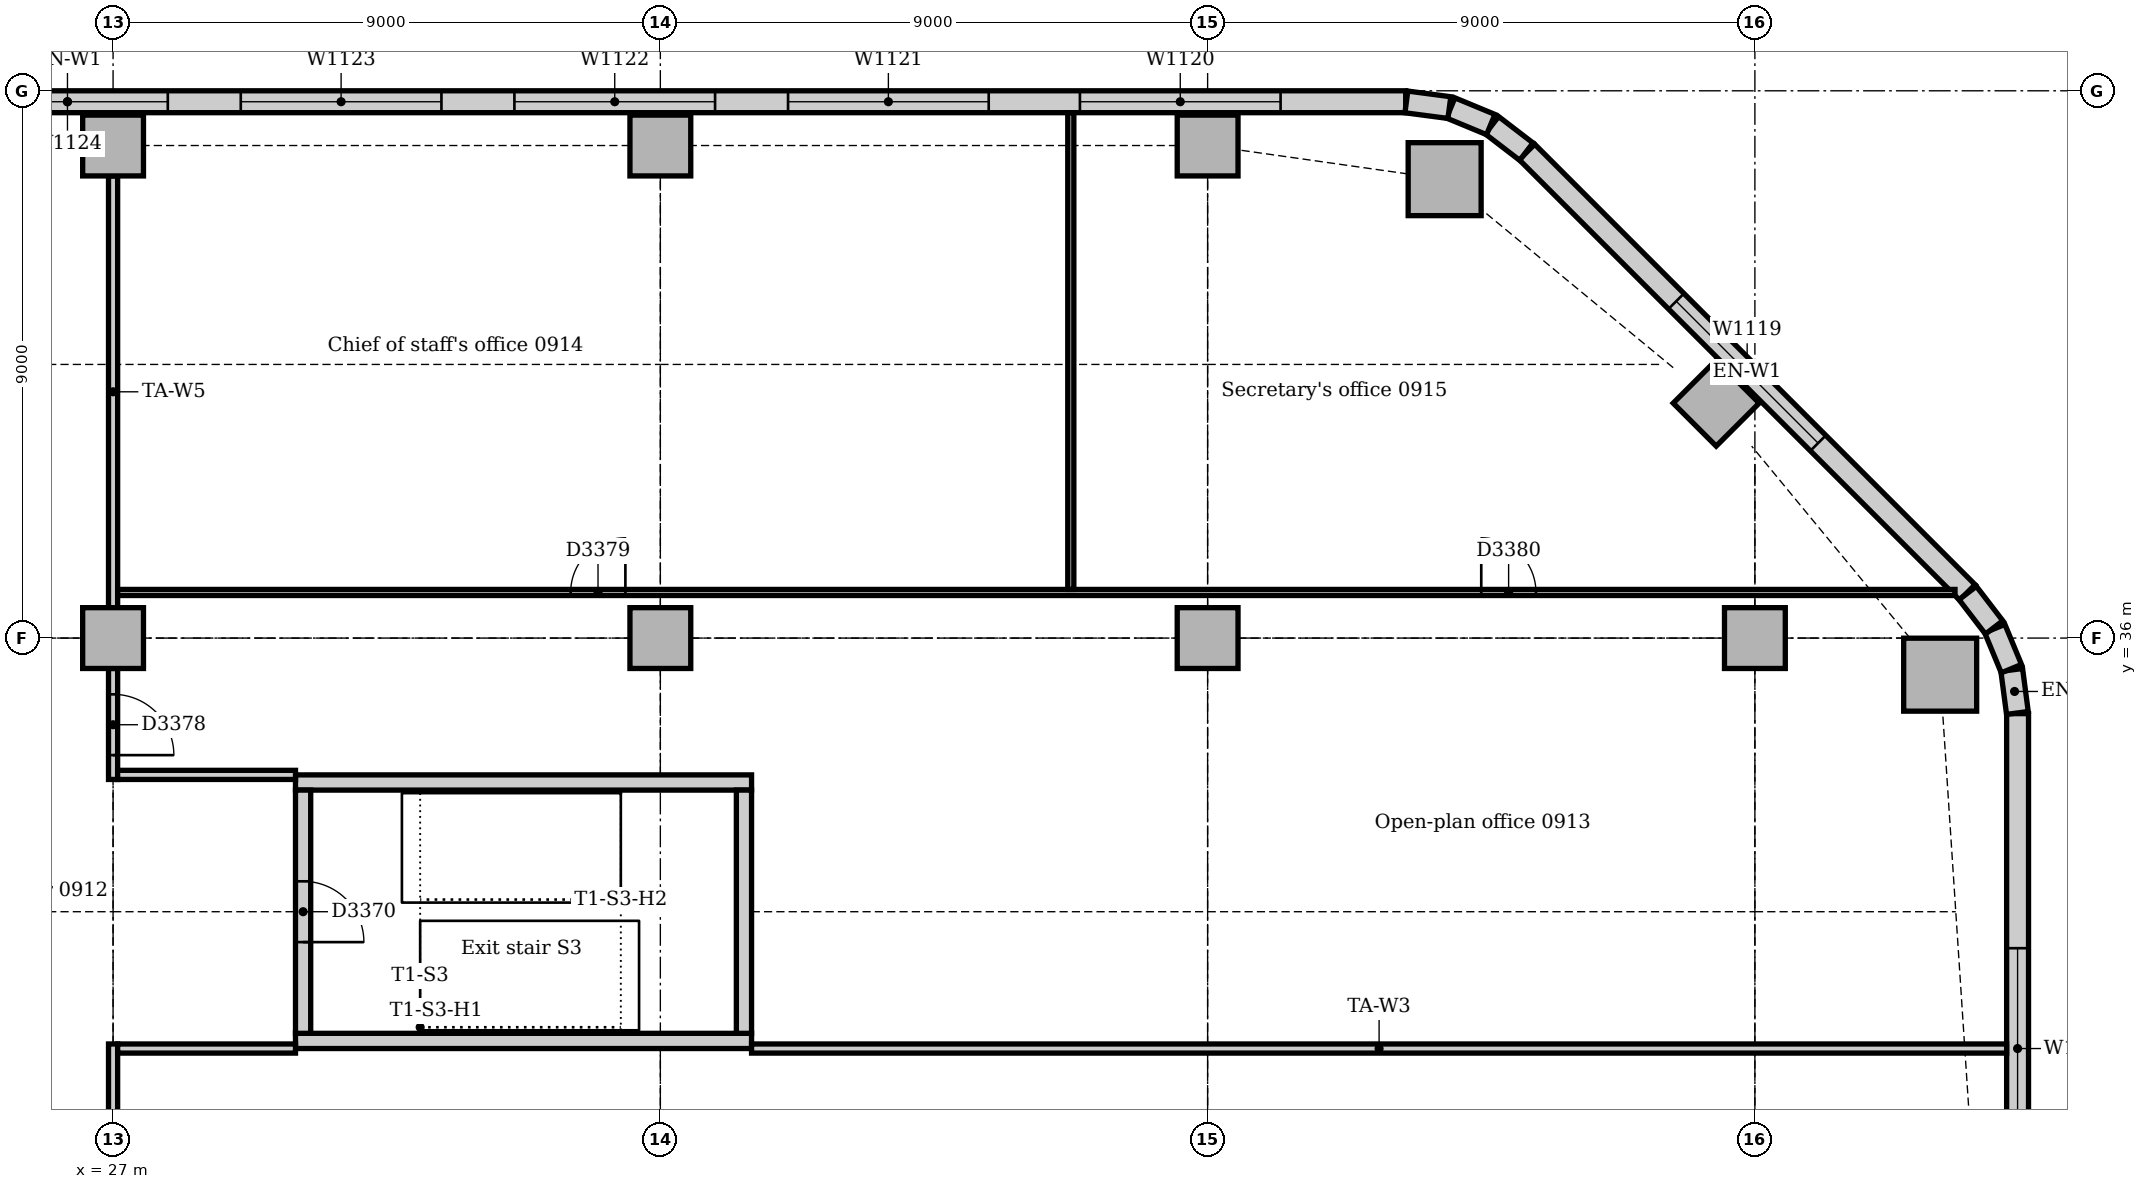
"""IFC4 building model, lengths in metres.
Left out: names, types, materials, properties, quantities, classifications, styles, units other than length and angle.
Written with IfcOpenShell. Run it as: python <this file> out.ifc"""

import sys

from ifc_helpers import new_model, si_unit, direction, frame, frame_2d, origin, origin_2d, place, context, subcontext, project, spatial, rectangle, extrude, element, fill, save


model = new_model("IFC4")
c1 = context("Model", 3, precision=1e-05, world=origin(), true_north=direction((0.0, 1.0)))
c2 = subcontext(c1, "Body", "Model", "MODEL_VIEW")
j1 = project(units=[si_unit("LENGTHUNIT", "METRE"), si_unit("PLANEANGLEUNIT", "RADIAN")], contexts=[c1])
p1 = place(None, origin())
s1 = spatial("IfcSite", under=j1, at=p1, CompositionType="ELEMENT")
p2 = place(p1, origin())
s2 = spatial("IfcBuilding", under=s1, at=p2, CompositionType="ELEMENT")
p3 = place(p2, frame((0.0, 0.0, 42.0)))
s3 = spatial("IfcBuildingStorey", under=s2, at=p3, CompositionType="ELEMENT", Elevation=42.0)
for number, where, z_axis, x_axis in (
    (1, (30.0, 29.375, 0.0), (0.0, 0.0, 1.0), (1.0, 0.0, 0.0)),
    (2, (37.5, 33.625, 0.0), (0.0, 0.0, 1.0), (-1.0, 0.0, 0.0)),
):
    element("IfcWall", number, at=place(p3, frame(where, z_axis=z_axis, x_axis=x_axis)), inside=s3, PredefinedType="SOLIDWALL", context=c2, shape_type="SweptSolid", body=[
        extrude(rectangle(XDim=7.5, YDim=0.25, at=frame_2d((3.75, 0.0))), origin(), (0.0, 0.0, 1.0), 4.0),
    ])
p4 = place(p3, frame((37.375, 29.5, 0.0), z_axis=(0.0, 0.0, 1.0), x_axis=(0.0, 1.0, 0.0)))
e3 = element("IfcWall", 3, at=p4, inside=s3, PredefinedType="SOLIDWALL", context=c2, shape_type="SweptSolid", body=[
    extrude(rectangle(XDim=4.0, YDim=0.25, at=frame_2d((2.0, 0.0))), origin(), (0.0, 0.0, 1.0), 4.0),
])
p5 = place(p3, frame((30.125, 33.5, 0.0), z_axis=(0.0, 0.0, 1.0), x_axis=(0.0, -1.0, 0.0)))
e4 = element("IfcWall", 4, at=p5, inside=s3, PredefinedType="SOLIDWALL", context=c2, shape_type="SweptSolid", body=[
    extrude(rectangle(XDim=4.0, YDim=0.25, at=frame_2d((2.0, 0.0))), origin(), (0.0, 0.0, 1.0), 4.0),
])
p6 = place(p5, frame((1.5, 0.0, 0.0)))
e5 = element("IfcOpeningElement", 5, at=p6, cuts=e4, PredefinedType="OPENING", context=c2, shape_type="SweptSolid", body=[
    extrude(rectangle(XDim=1.0, YDim=2.1, at=frame_2d((0.5, 1.05))), frame((0.0, 0.135, 0.0), z_axis=(0.0, -1.0, 0.0), x_axis=(1.0, 0.0, 0.0)), (0.0, 0.0, 1.0), 0.27),
])
for number, where, z_axis, x_axis in (
    (6, (57.047, 35.398, 0.0), (0.0, 0.0, 1.0), (1.0, 0.0, 0.0)),
    (7, (48.898, 43.547, 0.0), (0.0, 0.0, 1.0), (1.0, 0.0, 0.0)),
):
    element("IfcColumn", number, at=place(p3, frame(where, z_axis=z_axis, x_axis=x_axis)), inside=s3, PredefinedType="COLUMN", context=c2, shape_type="SweptSolid", body=[
        extrude(rectangle(XDim=1.2, YDim=1.2, at=origin_2d()), origin(), (0.0, 0.0, 1.0), 3.7),
    ])
for number, where, z_axis, x_axis in (
    (8, (53.364, 39.864, 0.0), (0.0, 0.0, 1.0), (0.707, 0.707, 0.0)),
    (9, (27.0, 44.1, 0.0), (0.0, 0.0, 1.0), (1.0, 0.0, 0.0)),
    (10, (36.0, 44.1, 0.0), (0.0, 0.0, 1.0), (1.0, 0.0, 0.0)),
    (11, (45.0, 44.1, 0.0), (0.0, 0.0, 1.0), (1.0, 0.0, 0.0)),
    (12, (27.0, 36.0, 0.0), (0.0, 0.0, 1.0), (1.0, 0.0, 0.0)),
    (13, (36.0, 36.0, 0.0), (0.0, 0.0, 1.0), (1.0, 0.0, 0.0)),
    (14, (45.0, 36.0, 0.0), (0.0, 0.0, 1.0), (1.0, 0.0, 0.0)),
    (15, (54.0, 36.0, 0.0), (0.0, 0.0, 1.0), (1.0, 0.0, 0.0)),
):
    element("IfcColumn", number, at=place(p3, frame(where, z_axis=z_axis, x_axis=x_axis)), inside=s3, PredefinedType="COLUMN", context=c2, shape_type="SweptSolid", body=[
        extrude(rectangle(XDim=1.0, YDim=1.0, at=origin_2d()), origin(), (0.0, 0.0, 1.0), 3.7),
    ])
p7 = place(p3, frame((58.32, 10.243, 0.0), z_axis=(0.0, 0.0, 1.0), x_axis=(0.0, 1.0, 0.0)))
e16 = element("IfcWall", 16, at=p7, inside=s3, PredefinedType="STANDARD", context=c2, shape_type="SweptSolid", body=[
    extrude(rectangle(XDim=24.515, YDim=0.36, at=frame_2d((12.257, 0.0))), origin(), (0.0, 0.0, 1.0), 3.7),
])
p8 = place(p7, frame((3.857, 0.0, 0.9)))
e17 = element("IfcOpeningElement", 17, at=p8, cuts=e16, PredefinedType="OPENING", context=c2, shape_type="SweptSolid", body=[
    extrude(rectangle(XDim=3.3, YDim=1.6, at=frame_2d((1.65, 0.8))), frame((0.0, 0.19, 0.0), z_axis=(0.0, -1.0, 0.0), x_axis=(1.0, 0.0, 0.0)), (0.0, 0.0, 1.0), 0.38),
])
p9 = place(p7, frame((8.757, 0.0, 0.9)))
e18 = element("IfcOpeningElement", 18, at=p9, cuts=e16, PredefinedType="OPENING", context=c2, shape_type="SweptSolid", body=[
    extrude(rectangle(XDim=1.8, YDim=1.6, at=frame_2d((0.9, 0.8))), frame((0.0, 0.19, 0.0), z_axis=(0.0, -1.0, 0.0), x_axis=(1.0, 0.0, 0.0)), (0.0, 0.0, 1.0), 0.38),
])
p10 = place(p7, frame((12.857, 0.0, 0.9)))
e19 = element("IfcOpeningElement", 19, at=p10, cuts=e16, PredefinedType="OPENING", context=c2, shape_type="SweptSolid", body=[
    extrude(rectangle(XDim=3.3, YDim=1.6, at=frame_2d((1.65, 0.8))), frame((0.0, 0.19, 0.0), z_axis=(0.0, -1.0, 0.0), x_axis=(1.0, 0.0, 0.0)), (0.0, 0.0, 1.0), 0.38),
])
p11 = place(p7, frame((17.357, 0.0, 0.9)))
e20 = element("IfcOpeningElement", 20, at=p11, cuts=e16, PredefinedType="OPENING", context=c2, shape_type="SweptSolid", body=[
    extrude(rectangle(XDim=3.3, YDim=1.6, at=frame_2d((1.65, 0.8))), frame((0.0, 0.19, 0.0), z_axis=(0.0, -1.0, 0.0), x_axis=(1.0, 0.0, 0.0)), (0.0, 0.0, 1.0), 0.38),
])
p12 = place(p3, frame((57.494, 36.751, 0.0), z_axis=(0.0, 0.0, 1.0), x_axis=(-0.707106781187, 0.707106781187, 0.0)))
e21 = element("IfcWall", 21, at=p12, inside=s3, PredefinedType="STANDARD", context=c2, shape_type="SweptSolid", body=[
    extrude(rectangle(XDim=10.243, YDim=0.36, at=frame_2d((5.121, 0.0))), origin(), (0.0, 0.0, 1.0), 3.7),
])
p13 = place(p12, frame((3.471, 0.0, 0.9)))
e22 = element("IfcOpeningElement", 22, at=p13, cuts=e21, PredefinedType="OPENING", context=c2, shape_type="SweptSolid", body=[
    extrude(rectangle(XDim=3.3, YDim=1.6, at=frame_2d((1.65, 0.8))), frame((0.0, 0.19, 0.0), z_axis=(0.0, -1.0, 0.0), x_axis=(1.0, 0.0, 0.0)), (0.0, 0.0, 1.0), 0.38),
])
p14 = place(p3, frame((48.257, 44.82, 0.0), z_axis=(0.0, 0.0, 1.0), x_axis=(-1.0, 0.0, 0.0)))
e23 = element("IfcWall", 23, at=p14, inside=s3, PredefinedType="STANDARD", context=c2, shape_type="SweptSolid", body=[
    extrude(rectangle(XDim=44.015, YDim=0.36, at=frame_2d((22.007, 0.0))), origin(), (0.0, 0.0, 1.0), 3.7),
])
p15 = place(p14, frame((2.057, 0.0, 0.9)))
e24 = element("IfcOpeningElement", 24, at=p15, cuts=e23, PredefinedType="OPENING", context=c2, shape_type="SweptSolid", body=[
    extrude(rectangle(XDim=3.3, YDim=1.6, at=frame_2d((1.65, 0.8))), frame((0.0, 0.19, 0.0), z_axis=(0.0, -1.0, 0.0), x_axis=(1.0, 0.0, 0.0)), (0.0, 0.0, 1.0), 0.38),
])
p16 = place(p14, frame((6.857, 0.0, 0.9)))
e25 = element("IfcOpeningElement", 25, at=p16, cuts=e23, PredefinedType="OPENING", context=c2, shape_type="SweptSolid", body=[
    extrude(rectangle(XDim=3.3, YDim=1.6, at=frame_2d((1.65, 0.8))), frame((0.0, 0.19, 0.0), z_axis=(0.0, -1.0, 0.0), x_axis=(1.0, 0.0, 0.0)), (0.0, 0.0, 1.0), 0.38),
])
p17 = place(p14, frame((11.357, 0.0, 0.9)))
e26 = element("IfcOpeningElement", 26, at=p17, cuts=e23, PredefinedType="OPENING", context=c2, shape_type="SweptSolid", body=[
    extrude(rectangle(XDim=3.3, YDim=1.6, at=frame_2d((1.65, 0.8))), frame((0.0, 0.19, 0.0), z_axis=(0.0, -1.0, 0.0), x_axis=(1.0, 0.0, 0.0)), (0.0, 0.0, 1.0), 0.38),
])
p18 = place(p14, frame((15.857, 0.0, 0.9)))
e27 = element("IfcOpeningElement", 27, at=p18, cuts=e23, PredefinedType="OPENING", context=c2, shape_type="SweptSolid", body=[
    extrude(rectangle(XDim=3.3, YDim=1.6, at=frame_2d((1.65, 0.8))), frame((0.0, 0.19, 0.0), z_axis=(0.0, -1.0, 0.0), x_axis=(1.0, 0.0, 0.0)), (0.0, 0.0, 1.0), 0.38),
])
p19 = place(p14, frame((20.357, 0.0, 0.9)))
e28 = element("IfcOpeningElement", 28, at=p19, cuts=e23, PredefinedType="OPENING", context=c2, shape_type="SweptSolid", body=[
    extrude(rectangle(XDim=3.3, YDim=1.6, at=frame_2d((1.65, 0.8))), frame((0.0, 0.19, 0.0), z_axis=(0.0, -1.0, 0.0), x_axis=(1.0, 0.0, 0.0)), (0.0, 0.0, 1.0), 0.38),
])
p20 = place(p14, frame((25.957, 0.0, 0.9)))
e29 = element("IfcOpeningElement", 29, at=p20, cuts=e23, PredefinedType="OPENING", context=c2, shape_type="SweptSolid", body=[
    extrude(rectangle(XDim=1.8, YDim=1.6, at=frame_2d((0.9, 0.8))), frame((0.0, 0.19, 0.0), z_axis=(0.0, -1.0, 0.0), x_axis=(1.0, 0.0, 0.0)), (0.0, 0.0, 1.0), 0.38),
])
p21 = place(p14, frame((29.357, 0.0, 0.9)))
e30 = element("IfcOpeningElement", 30, at=p21, cuts=e23, PredefinedType="OPENING", context=c2, shape_type="SweptSolid", body=[
    extrude(rectangle(XDim=3.3, YDim=1.6, at=frame_2d((1.65, 0.8))), frame((0.0, 0.19, 0.0), z_axis=(0.0, -1.0, 0.0), x_axis=(1.0, 0.0, 0.0)), (0.0, 0.0, 1.0), 0.38),
])
p22 = place(p14, frame((33.857, 0.0, 0.9)))
e31 = element("IfcOpeningElement", 31, at=p22, cuts=e23, PredefinedType="OPENING", context=c2, shape_type="SweptSolid", body=[
    extrude(rectangle(XDim=3.3, YDim=1.6, at=frame_2d((1.65, 0.8))), frame((0.0, 0.19, 0.0), z_axis=(0.0, -1.0, 0.0), x_axis=(1.0, 0.0, 0.0)), (0.0, 0.0, 1.0), 0.38),
])
p23 = place(p14, frame((38.357, 0.0, 0.9)))
e32 = element("IfcOpeningElement", 32, at=p23, cuts=e23, PredefinedType="OPENING", context=c2, shape_type="SweptSolid", body=[
    extrude(rectangle(XDim=3.3, YDim=1.6, at=frame_2d((1.65, 0.8))), frame((0.0, 0.19, 0.0), z_axis=(0.0, -1.0, 0.0), x_axis=(1.0, 0.0, 0.0)), (0.0, 0.0, 1.0), 0.38),
])
for number, where, z_axis, x_axis in (
    (33, (58.317, 34.769, 0.0), (0.0, 0.0, 1.0), (-0.131, 0.991, 0.0)),
    (34, (58.218, 35.497, 0.0), (0.0, 0.0, 1.0), (-0.383, 0.924, 0.0)),
):
    element("IfcWall", number, at=place(p3, frame(where, z_axis=z_axis, x_axis=x_axis)), inside=s3, PredefinedType="STANDARD", context=c2, shape_type="SweptSolid", body=[
        extrude(rectangle(XDim=0.713, YDim=0.36, at=frame_2d((0.356, 0.0))), origin(), (0.0, 0.0, 1.0), 3.7),
    ])
for number, where, z_axis, x_axis in (
    (35, (57.934, 36.175, 0.0), (0.0, 0.0, 1.0), (-0.609, 0.793, 0.0)),
    (36, (50.241, 44.0, 0.0), (0.0, 0.0, 1.0), (-0.793, 0.609, 0.0)),
):
    element("IfcWall", number, at=place(p3, frame(where, z_axis=z_axis, x_axis=x_axis)), inside=s3, PredefinedType="STANDARD", context=c2, shape_type="SweptSolid", body=[
        extrude(rectangle(XDim=0.713, YDim=0.36, at=frame_2d((0.357, 0.0))), origin(), (0.0, 0.0, 1.0), 3.7),
    ])
for number, where, z_axis, x_axis in (
    (37, (49.656, 44.445, 0.0), (0.0, 0.0, 1.0), (-0.924, 0.383, 0.0)),
    (38, (48.976, 44.724, 0.0), (0.0, 0.0, 1.0), (-0.991, 0.131, 0.0)),
):
    element("IfcWall", number, at=place(p3, frame(where, z_axis=z_axis, x_axis=x_axis)), inside=s3, PredefinedType="STANDARD", context=c2, shape_type="SweptSolid", body=[
        extrude(rectangle(XDim=0.713, YDim=0.36, at=frame_2d((0.356, 0.0))), origin(), (0.0, 0.0, 1.0), 3.7),
    ])
p24 = place(p3, frame((27.0, 33.675, 0.0), z_axis=(0.0, 0.0, 1.0), x_axis=(0.0, 1.0, 0.0)))
e39 = element("IfcWall", 39, at=p24, inside=s3, PredefinedType="PARTITIONING", context=c2, shape_type="SweptSolid", body=[
    extrude(rectangle(XDim=1.825, YDim=0.15, at=frame_2d((0.912, 0.0))), origin(), (0.0, 0.0, 1.0), 3.008),
])
p25 = place(p24, frame((0.4, 0.0, 0.0)))
e40 = element("IfcOpeningElement", 40, at=p25, cuts=e39, PredefinedType="OPENING", context=c2, shape_type="SweptSolid", body=[
    extrude(rectangle(XDim=1.0, YDim=2.1, at=frame_2d((0.5, 1.05))), frame((0.0, 0.085, 0.0), z_axis=(0.0, -1.0, 0.0), x_axis=(1.0, 0.0, 0.0)), (0.0, 0.0, 1.0), 0.17),
])
p26 = place(p3, frame((27.0, 36.5, 0.0), z_axis=(0.0, 0.0, 1.0), x_axis=(0.0, 1.0, 0.0)))
e41 = element("IfcWall", 41, at=p26, inside=s3, PredefinedType="PARTITIONING", context=c2, shape_type="SweptSolid", body=[
    extrude(rectangle(XDim=7.1, YDim=0.15, at=frame_2d((3.55, 0.0))), origin(), (0.0, 0.0, 1.0), 3.008),
])
p27 = place(p3, frame((27.0, 27.5, 0.0), z_axis=(0.0, 0.0, 1.0), x_axis=(0.0, 1.0, 0.0)))
e42 = element("IfcWall", 42, at=p27, inside=s3, PredefinedType="PARTITIONING", context=c2, shape_type="SweptSolid", body=[
    extrude(rectangle(XDim=1.825, YDim=0.15, at=frame_2d((0.912, 0.0))), origin(), (0.0, 0.0, 1.0), 3.008),
])
for number, where, z_axis, x_axis in (
    (43, (27.075, 29.25, 0.0), (0.0, 0.0, 1.0), (1.0, 0.0, 0.0)),
    (44, (27.075, 33.75, 0.0), (0.0, 0.0, 1.0), (1.0, 0.0, 0.0)),
):
    element("IfcWall", number, at=place(p3, frame(where, z_axis=z_axis, x_axis=x_axis)), inside=s3, PredefinedType="PARTITIONING", context=c2, shape_type="SweptSolid", body=[
        extrude(rectangle(XDim=2.925, YDim=0.15, at=frame_2d((1.462, 0.0))), origin(), (0.0, 0.0, 1.0), 3.7),
    ])
p28 = place(p3, frame((37.5, 29.25, 0.0), z_axis=(0.0, 0.0, 1.0), x_axis=(1.0, 0.0, 0.0)))
e45 = element("IfcWall", 45, at=p28, inside=s3, PredefinedType="PARTITIONING", context=c2, shape_type="SweptSolid", body=[
    extrude(rectangle(XDim=20.64, YDim=0.15, at=frame_2d((10.32, 0.0))), origin(), (0.0, 0.0, 1.0), 3.7),
])
p29 = place(p3, frame((27.075, 36.75, 0.0), z_axis=(0.0, 0.0, 1.0), x_axis=(1.0, 0.0, 0.0)))
e46 = element("IfcWall", 46, at=p29, inside=s3, PredefinedType="PARTITIONING", context=c2, shape_type="SweptSolid", body=[
    extrude(rectangle(XDim=30.216, YDim=0.1, at=frame_2d((15.108, 0.0))), origin(), (0.0, 0.0, 1.0), 3.7),
])
p30 = place(p29, frame((7.45, 0.0, 0.0)))
e47 = element("IfcOpeningElement", 47, at=p30, cuts=e46, PredefinedType="OPENING", context=c2, shape_type="SweptSolid", body=[
    extrude(rectangle(XDim=0.9, YDim=2.1, at=frame_2d((0.45, 1.05))), frame((0.0, 0.06, 0.0), z_axis=(0.0, -1.0, 0.0), x_axis=(1.0, 0.0, 0.0)), (0.0, 0.0, 1.0), 0.12),
])
p31 = place(p29, frame((22.425, 0.0, 0.0)))
e48 = element("IfcOpeningElement", 48, at=p31, cuts=e46, PredefinedType="OPENING", context=c2, shape_type="SweptSolid", body=[
    extrude(rectangle(XDim=0.9, YDim=2.1, at=frame_2d((0.45, 1.05))), frame((0.0, 0.06, 0.0), z_axis=(0.0, -1.0, 0.0), x_axis=(1.0, 0.0, 0.0)), (0.0, 0.0, 1.0), 0.12),
])
p32 = place(p3, frame((42.75, 36.8, 0.0), z_axis=(0.0, 0.0, 1.0), x_axis=(0.0, 1.0, 0.0)))
e49 = element("IfcWall", 49, at=p32, inside=s3, PredefinedType="PARTITIONING", context=c2, shape_type="SweptSolid", body=[
    extrude(rectangle(XDim=7.84, YDim=0.1, at=frame_2d((3.92, 0.0))), origin(), (0.0, 0.0, 1.0), 3.7),
])
p33 = place(p11, origin())
e50 = element("IfcWindow", 50, at=p33, inside=s3, PartitioningType="SINGLE_PANEL", PredefinedType="WINDOW", context=c2, shape_type="SweptSolid", body=[
    extrude(rectangle(XDim=3.3, YDim=1.6, at=frame_2d((1.65, 0.8))), frame((0.0, 0.13, 0.0), z_axis=(0.0, -1.0, 0.0), x_axis=(1.0, 0.0, 0.0)), (0.0, 0.0, 1.0), 0.06),
])
fill(e20, e50)
p34 = place(p13, origin())
e51 = element("IfcWindow", 51, at=p34, inside=s3, PartitioningType="SINGLE_PANEL", PredefinedType="WINDOW", context=c2, shape_type="SweptSolid", body=[
    extrude(rectangle(XDim=3.3, YDim=1.6, at=frame_2d((1.65, 0.8))), frame((0.0, 0.13, 0.0), z_axis=(0.0, -1.0, 0.0), x_axis=(1.0, 0.0, 0.0)), (0.0, 0.0, 1.0), 0.06),
])
fill(e22, e51)
p35 = place(p15, origin())
e52 = element("IfcWindow", 52, at=p35, inside=s3, PartitioningType="SINGLE_PANEL", PredefinedType="WINDOW", context=c2, shape_type="SweptSolid", body=[
    extrude(rectangle(XDim=3.3, YDim=1.6, at=frame_2d((1.65, 0.8))), frame((0.0, 0.13, 0.0), z_axis=(0.0, -1.0, 0.0), x_axis=(1.0, 0.0, 0.0)), (0.0, 0.0, 1.0), 0.06),
])
fill(e24, e52)
p36 = place(p16, origin())
e53 = element("IfcWindow", 53, at=p36, inside=s3, PartitioningType="SINGLE_PANEL", PredefinedType="WINDOW", context=c2, shape_type="SweptSolid", body=[
    extrude(rectangle(XDim=3.3, YDim=1.6, at=frame_2d((1.65, 0.8))), frame((0.0, 0.13, 0.0), z_axis=(0.0, -1.0, 0.0), x_axis=(1.0, 0.0, 0.0)), (0.0, 0.0, 1.0), 0.06),
])
fill(e25, e53)
p37 = place(p17, origin())
e54 = element("IfcWindow", 54, at=p37, inside=s3, PartitioningType="SINGLE_PANEL", PredefinedType="WINDOW", context=c2, shape_type="SweptSolid", body=[
    extrude(rectangle(XDim=3.3, YDim=1.6, at=frame_2d((1.65, 0.8))), frame((0.0, 0.13, 0.0), z_axis=(0.0, -1.0, 0.0), x_axis=(1.0, 0.0, 0.0)), (0.0, 0.0, 1.0), 0.06),
])
fill(e26, e54)
p38 = place(p18, origin())
e55 = element("IfcWindow", 55, at=p38, inside=s3, PartitioningType="SINGLE_PANEL", PredefinedType="WINDOW", context=c2, shape_type="SweptSolid", body=[
    extrude(rectangle(XDim=3.3, YDim=1.6, at=frame_2d((1.65, 0.8))), frame((0.0, 0.13, 0.0), z_axis=(0.0, -1.0, 0.0), x_axis=(1.0, 0.0, 0.0)), (0.0, 0.0, 1.0), 0.06),
])
fill(e27, e55)
p39 = place(p19, origin())
e56 = element("IfcWindow", 56, at=p39, inside=s3, PartitioningType="SINGLE_PANEL", PredefinedType="WINDOW", context=c2, shape_type="SweptSolid", body=[
    extrude(rectangle(XDim=3.3, YDim=1.6, at=frame_2d((1.65, 0.8))), frame((0.0, 0.13, 0.0), z_axis=(0.0, -1.0, 0.0), x_axis=(1.0, 0.0, 0.0)), (0.0, 0.0, 1.0), 0.06),
])
fill(e28, e56)
p40 = place(p6, origin())
e57 = element("IfcDoor", 57, at=p40, inside=s3, OperationType="SINGLE_SWING_RIGHT", PredefinedType="DOOR", context=c2, shape_type="SweptSolid", body=[
    extrude(rectangle(XDim=1.0, YDim=2.1, at=frame_2d((0.5, 1.05))), frame((0.0, 0.025, 0.0), z_axis=(0.0, -1.0, 0.0), x_axis=(1.0, 0.0, 0.0)), (0.0, 0.0, 1.0), 0.05),
])
fill(e5, e57)
p41 = place(p25, frame((1.0, 0.0, 0.0), z_axis=(0.0, 0.0, 1.0), x_axis=(-1.0, 0.0, 0.0)))
e58 = element("IfcDoor", 58, at=p41, inside=s3, OperationType="SINGLE_SWING_RIGHT", PredefinedType="DOOR", context=c2, shape_type="SweptSolid", body=[
    extrude(rectangle(XDim=1.0, YDim=2.1, at=frame_2d((0.5, 1.05))), frame((0.0, 0.025, 0.0), z_axis=(0.0, -1.0, 0.0), x_axis=(1.0, 0.0, 0.0)), (0.0, 0.0, 1.0), 0.05),
])
fill(e40, e58)
p42 = place(p30, origin())
e59 = element("IfcDoor", 59, at=p42, inside=s3, OperationType="SINGLE_SWING_RIGHT", PredefinedType="DOOR", context=c2, shape_type="SweptSolid", body=[
    extrude(rectangle(XDim=0.9, YDim=2.1, at=frame_2d((0.45, 1.05))), frame((0.0, 0.025, 0.0), z_axis=(0.0, -1.0, 0.0), x_axis=(1.0, 0.0, 0.0)), (0.0, 0.0, 1.0), 0.05),
])
fill(e47, e59)
p43 = place(p31, origin())
e60 = element("IfcDoor", 60, at=p43, inside=s3, OperationType="SINGLE_SWING_LEFT", PredefinedType="DOOR", context=c2, shape_type="SweptSolid", body=[
    extrude(rectangle(XDim=0.9, YDim=2.1, at=frame_2d((0.45, 1.05))), frame((0.0, 0.025, 0.0), z_axis=(0.0, -1.0, 0.0), x_axis=(1.0, 0.0, 0.0)), (0.0, 0.0, 1.0), 0.05),
])
fill(e48, e60)
save(model, sys.argv[1])
